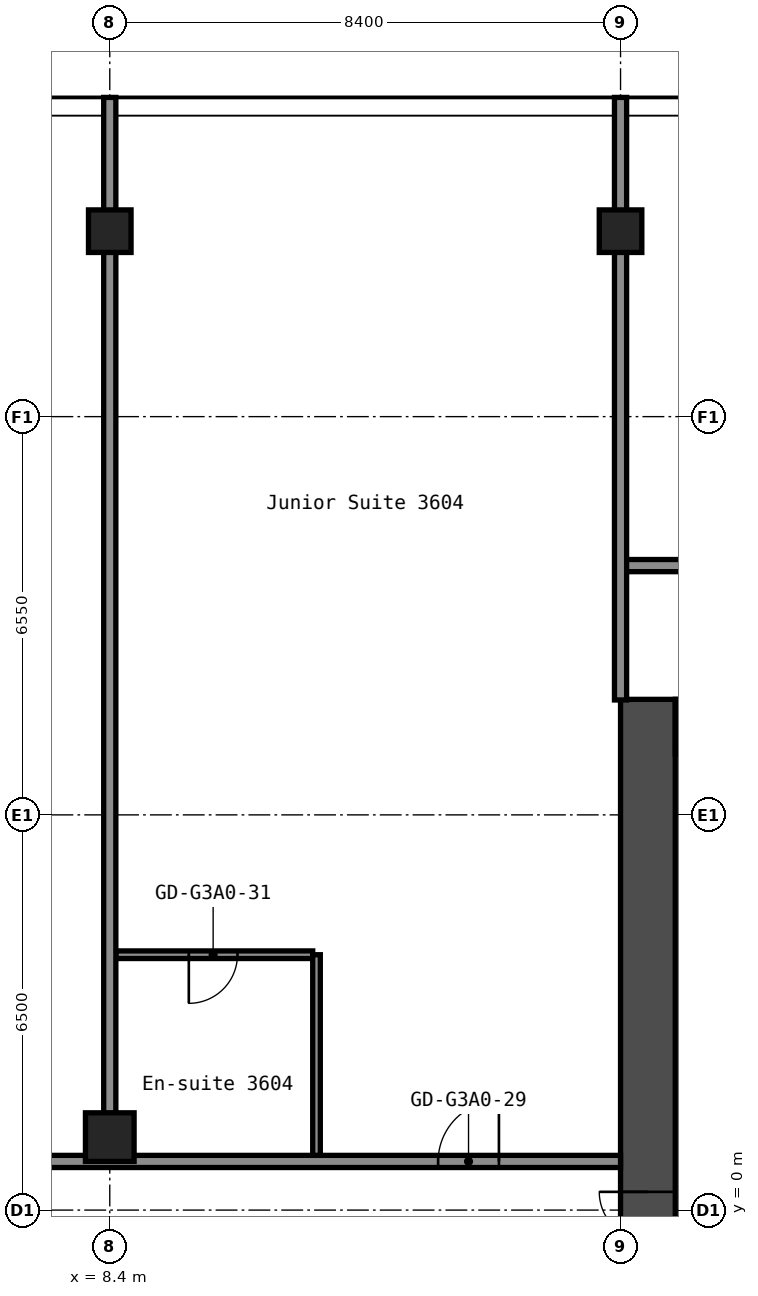
"""IFC4 building model, lengths in metres.
Left out: names, types, materials, properties, quantities, classifications, styles, units other than length and angle.
Written with IfcOpenShell. Run it as: python <this file> out.ifc"""

import sys

from ifc_helpers import new_model, si_unit, direction, frame, frame_2d, origin, origin_2d, place, context, subcontext, project, spatial, rectangle, hollow_rectangle, extrude, element, fill, save


model = new_model("IFC4")
c1 = context("Model", 3, precision=1e-05, world=origin(), true_north=direction((0.0, 1.0)))
c2 = subcontext(c1, "Body", "Model", "MODEL_VIEW")
j1 = project(units=[si_unit("LENGTHUNIT", "METRE"), si_unit("PLANEANGLEUNIT", "RADIAN")], contexts=[c1])
p1 = place(None, origin())
s1 = spatial("IfcSite", under=j1, at=p1, CompositionType="ELEMENT")
p2 = place(p1, origin())
s2 = spatial("IfcBuilding", under=s1, at=p2, CompositionType="ELEMENT")
p3 = place(p2, frame((0.0, 0.0, 131.0)))
s3 = spatial("IfcBuildingStorey", under=s2, at=p3, CompositionType="ELEMENT", Elevation=131.0)
p4 = place(p3, frame((8.4, 1.2, 0.0), z_axis=(0.0, 0.0, 1.0), x_axis=(1.0, 0.0, 0.0)))
e1 = element("IfcColumn", 1, at=p4, inside=s3, PredefinedType="COLUMN", context=c2, shape_type="SweptSolid", body=[
    extrude(hollow_rectangle(XDim=0.8, YDim=0.8, WallThickness=0.032, at=origin_2d()), origin(), (0.0, 0.0, 1.0), 2.75),
])
for number, where, z_axis, x_axis in (
    (2, (8.4, 16.1, 0.0), (0.0, 0.0, 1.0), (1.0, 0.0, 0.0)),
    (3, (16.8, 16.1, 0.0), (0.0, 0.0, 1.0), (1.0, 0.0, 0.0)),
):
    element("IfcColumn", number, at=place(p3, frame(where, z_axis=z_axis, x_axis=x_axis)), inside=s3, PredefinedType="COLUMN", context=c2, shape_type="SweptSolid", body=[
        extrude(hollow_rectangle(XDim=0.7, YDim=0.7, WallThickness=0.028, at=origin_2d()), origin(), (0.0, 0.0, 1.0), 2.75),
    ])
p5 = place(p3, frame((17.25, -8.4, 0.0), z_axis=(0.0, 0.0, 1.0), x_axis=(0.0, 1.0, 0.0)))
e4 = element("IfcWall", 4, at=p5, inside=s3, PredefinedType="SHEAR", context=c2, shape_type="SweptSolid", body=[
    extrude(rectangle(XDim=16.8, YDim=0.9, at=frame_2d((8.4, 0.0))), origin(), (0.0, 0.0, 1.0), 2.75),
])
p6 = place(p5, frame((7.1, 0.0, 0.0)))
e5 = element("IfcOpeningElement", 5, at=p6, cuts=e4, PredefinedType="OPENING", context=c2, shape_type="SweptSolid", body=[
    extrude(rectangle(XDim=1.6, YDim=2.1, at=frame_2d((0.8, 1.05))), frame((0.0, 0.46, 0.0), z_axis=(0.0, -1.0, 0.0), x_axis=(1.0, 0.0, 0.0)), (0.0, 0.0, 1.0), 0.92),
])
p7 = place(p3, frame((17.7, 7.95, 0.0), z_axis=(0.0, 0.0, 1.0), x_axis=(1.0, 0.0, 0.0)))
e6 = element("IfcWall", 6, at=p7, inside=s3, PredefinedType="SHEAR", context=c2, shape_type="SweptSolid", body=[
    extrude(rectangle(XDim=15.0, YDim=0.9, at=frame_2d((7.5, 0.0))), origin(), (0.0, 0.0, 1.0), 2.75),
])
p8 = place(p7, frame((10.4, 0.0, 0.0)))
e7 = element("IfcOpeningElement", 7, at=p8, cuts=e6, PredefinedType="OPENING", context=c2, shape_type="SweptSolid", body=[
    extrude(rectangle(XDim=1.2, YDim=2.1, at=frame_2d((0.6, 1.05))), frame((0.0, 0.46, 0.0), z_axis=(0.0, -1.0, 0.0), x_axis=(1.0, 0.0, 0.0)), (0.0, 0.0, 1.0), 0.92),
])
p9 = place(p7, frame((13.35, 0.0, 0.0)))
e8 = element("IfcOpeningElement", 8, at=p9, cuts=e6, PredefinedType="OPENING", context=c2, shape_type="SweptSolid", body=[
    extrude(rectangle(XDim=0.9, YDim=2.1, at=frame_2d((0.45, 1.05))), frame((0.0, 0.46, 0.0), z_axis=(0.0, -1.0, 0.0), x_axis=(1.0, 0.0, 0.0)), (0.0, 0.0, 1.0), 0.92),
])
p10 = place(p3, frame((-16.8, 0.8, 0.0), z_axis=(0.0, 0.0, 1.0), x_axis=(1.0, 0.0, 0.0)))
e9 = element("IfcWall", 9, at=p10, inside=s3, PredefinedType="PARTITIONING", context=c2, shape_type="SweptSolid", body=[
    extrude(rectangle(XDim=33.6, YDim=0.2, at=frame_2d((16.8, 0.0))), origin(), (0.0, 0.0, 1.0), 2.75),
])
p11 = place(p10, frame((2.0, 0.0, 0.0)))
e10 = element("IfcOpeningElement", 10, at=p11, cuts=e9, PredefinedType="OPENING", context=c2, shape_type="SweptSolid", body=[
    extrude(rectangle(XDim=1.0, YDim=2.1, at=frame_2d((0.5, 1.05))), frame((0.0, 0.11, 0.0), z_axis=(0.0, -1.0, 0.0), x_axis=(1.0, 0.0, 0.0)), (0.0, 0.0, 1.0), 0.22),
])
p12 = place(p10, frame((12.1, 0.0, 0.0)))
e11 = element("IfcOpeningElement", 11, at=p12, cuts=e9, PredefinedType="OPENING", context=c2, shape_type="SweptSolid", body=[
    extrude(rectangle(XDim=1.0, YDim=2.1, at=frame_2d((0.5, 1.05))), frame((0.0, 0.11, 0.0), z_axis=(0.0, -1.0, 0.0), x_axis=(1.0, 0.0, 0.0)), (0.0, 0.0, 1.0), 0.22),
])
p13 = place(p10, frame((18.03, 0.0, 0.0)))
e12 = element("IfcOpeningElement", 12, at=p13, cuts=e9, PredefinedType="OPENING", context=c2, shape_type="SweptSolid", body=[
    extrude(rectangle(XDim=0.9, YDim=2.1, at=frame_2d((0.45, 1.05))), frame((0.0, 0.11, 0.0), z_axis=(0.0, -1.0, 0.0), x_axis=(1.0, 0.0, 0.0)), (0.0, 0.0, 1.0), 0.22),
])
p14 = place(p10, frame((22.23, 0.0, 0.0)))
e13 = element("IfcOpeningElement", 13, at=p14, cuts=e9, PredefinedType="OPENING", context=c2, shape_type="SweptSolid", body=[
    extrude(rectangle(XDim=0.9, YDim=2.1, at=frame_2d((0.45, 1.05))), frame((0.0, 0.11, 0.0), z_axis=(0.0, -1.0, 0.0), x_axis=(1.0, 0.0, 0.0)), (0.0, 0.0, 1.0), 0.22),
])
p15 = place(p10, frame((30.6, 0.0, 0.0)))
e14 = element("IfcOpeningElement", 14, at=p15, cuts=e9, PredefinedType="OPENING", context=c2, shape_type="SweptSolid", body=[
    extrude(rectangle(XDim=1.0, YDim=2.1, at=frame_2d((0.5, 1.05))), frame((0.0, 0.11, 0.0), z_axis=(0.0, -1.0, 0.0), x_axis=(1.0, 0.0, 0.0)), (0.0, 0.0, 1.0), 0.22),
])
p16 = place(p3, frame((8.5, 4.2, 0.0), z_axis=(0.0, 0.0, 1.0), x_axis=(1.0, 0.0, 0.0)))
e15 = element("IfcWall", 15, at=p16, inside=s3, PredefinedType="PARTITIONING", context=c2, shape_type="SweptSolid", body=[
    extrude(rectangle(XDim=3.238, YDim=0.125, at=frame_2d((1.619, 0.0))), origin(), (0.0, 0.0, 1.0), 2.75),
])
p17 = place(p16, frame((1.2, 0.0, 0.0)))
e16 = element("IfcOpeningElement", 16, at=p17, cuts=e15, PredefinedType="OPENING", context=c2, shape_type="SweptSolid", body=[
    extrude(rectangle(XDim=0.8, YDim=2.1, at=frame_2d((0.4, 1.05))), frame((0.0, 0.073, 0.0), z_axis=(0.0, -1.0, 0.0), x_axis=(1.0, 0.0, 0.0)), (0.0, 0.0, 1.0), 0.145),
])
p18 = place(p3, frame((16.8, 10.6, 0.0), z_axis=(0.0, 0.0, 1.0), x_axis=(1.0, 0.0, 0.0)))
e17 = element("IfcWall", 17, at=p18, inside=s3, PredefinedType="PARTITIONING", context=c2, shape_type="SweptSolid", body=[
    extrude(rectangle(XDim=25.9, YDim=0.2, at=frame_2d((12.95, 0.0))), origin(), (0.0, 0.0, 1.0), 2.75),
])
p19 = place(p18, frame((2.0, 0.0, 0.0)))
e18 = element("IfcOpeningElement", 18, at=p19, cuts=e17, PredefinedType="OPENING", context=c2, shape_type="SweptSolid", body=[
    extrude(rectangle(XDim=1.0, YDim=2.1, at=frame_2d((0.5, 1.05))), frame((0.0, 0.11, 0.0), z_axis=(0.0, -1.0, 0.0), x_axis=(1.0, 0.0, 0.0)), (0.0, 0.0, 1.0), 0.22),
])
p20 = place(p18, frame((10.4, 0.0, 0.0)))
e19 = element("IfcOpeningElement", 19, at=p20, cuts=e17, PredefinedType="OPENING", context=c2, shape_type="SweptSolid", body=[
    extrude(rectangle(XDim=1.0, YDim=2.1, at=frame_2d((0.5, 1.05))), frame((0.0, 0.11, 0.0), z_axis=(0.0, -1.0, 0.0), x_axis=(1.0, 0.0, 0.0)), (0.0, 0.0, 1.0), 0.22),
])
p21 = place(p18, frame((19.0, 0.0, 0.0)))
e20 = element("IfcOpeningElement", 20, at=p21, cuts=e17, PredefinedType="OPENING", context=c2, shape_type="SweptSolid", body=[
    extrude(rectangle(XDim=1.0, YDim=2.1, at=frame_2d((0.5, 1.05))), frame((0.0, 0.11, 0.0), z_axis=(0.0, -1.0, 0.0), x_axis=(1.0, 0.0, 0.0)), (0.0, 0.0, 1.0), 0.22),
])
p22 = place(p3, frame((8.4, 1.59, 0.0), z_axis=(0.0, 0.0, 1.0), x_axis=(0.0, 1.0, 0.0)))
e21 = element("IfcWall", 21, at=p22, inside=s3, PredefinedType="PARTITIONING", context=c2, shape_type="SweptSolid", body=[
    extrude(rectangle(XDim=16.71, YDim=0.2, at=frame_2d((8.355, 0.0))), origin(), (0.0, 0.0, 1.0), 2.75),
])
p23 = place(p3, frame((11.8, 0.9, 0.0), z_axis=(0.0, 0.0, 1.0), x_axis=(0.0, 1.0, 0.0)))
e22 = element("IfcWall", 22, at=p23, inside=s3, PredefinedType="PARTITIONING", context=c2, shape_type="SweptSolid", body=[
    extrude(rectangle(XDim=3.3, YDim=0.125, at=frame_2d((1.65, 0.0))), origin(), (0.0, 0.0, 1.0), 2.75),
])
p24 = place(p3, frame((16.8, 8.39, 0.0), z_axis=(0.0, 0.0, 1.0), x_axis=(0.0, 1.0, 0.0)))
e23 = element("IfcWall", 23, at=p24, inside=s3, PredefinedType="PARTITIONING", context=c2, shape_type="SweptSolid", body=[
    extrude(rectangle(XDim=9.91, YDim=0.2, at=frame_2d((4.955, 0.0))), origin(), (0.0, 0.0, 1.0), 2.75),
])
p25 = place(p6, origin())
e24 = element("IfcDoor", 24, at=p25, inside=s3, OperationType="DOUBLE_DOOR_SINGLE_SWING", PredefinedType="DOOR", context=c2, shape_type="SweptSolid", body=[
    extrude(rectangle(XDim=1.6, YDim=2.1, at=frame_2d((0.8, 1.05))), frame((0.0, 0.025, 0.0), z_axis=(0.0, -1.0, 0.0), x_axis=(1.0, 0.0, 0.0)), (0.0, 0.0, 1.0), 0.05),
])
fill(e5, e24)
p26 = place(p15, origin())
e25 = element("IfcDoor", 25, at=p26, inside=s3, OperationType="SINGLE_SWING_LEFT", PredefinedType="DOOR", context=c2, shape_type="SweptSolid", body=[
    extrude(rectangle(XDim=1.0, YDim=2.1, at=frame_2d((0.5, 1.05))), frame((0.0, 0.025, 0.0), z_axis=(0.0, -1.0, 0.0), x_axis=(1.0, 0.0, 0.0)), (0.0, 0.0, 1.0), 0.05),
])
fill(e14, e25)
p27 = place(p17, origin())
e26 = element("IfcDoor", 26, at=p27, inside=s3, OperationType="SINGLE_SWING_LEFT", PredefinedType="DOOR", context=c2, shape_type="SweptSolid", body=[
    extrude(rectangle(XDim=0.8, YDim=2.1, at=frame_2d((0.4, 1.05))), frame((0.0, 0.025, 0.0), z_axis=(0.0, -1.0, 0.0), x_axis=(1.0, 0.0, 0.0)), (0.0, 0.0, 1.0), 0.05),
])
fill(e16, e26)
save(model, sys.argv[1])
